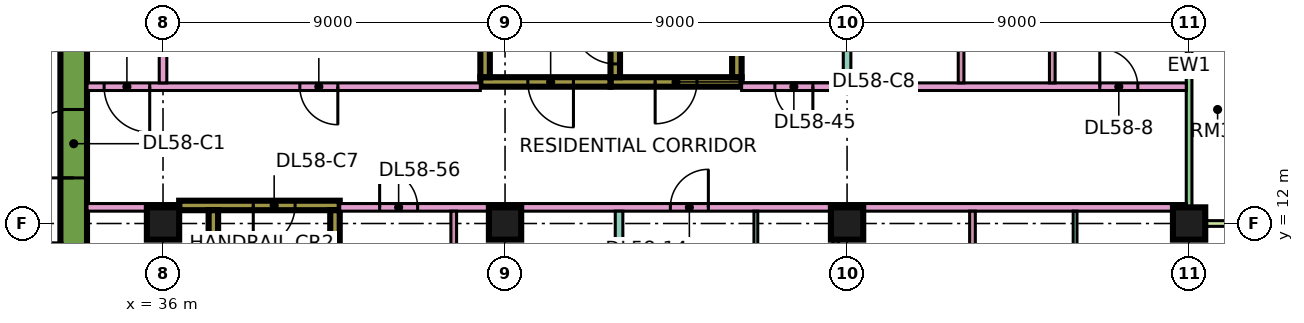
"""IFC4 building model, lengths in metres.
Left out: names, types, materials, properties, quantities, classifications, styles, units other than length and angle.
Written with IfcOpenShell. Run it as: python <this file> out.ifc"""

import sys

from ifc_helpers import new_model, si_unit, direction, frame, frame_2d, origin, origin_2d, place, context, subcontext, project, spatial, rectangle, extrude, element, fill, save


model = new_model("IFC4")
c1 = context("Model", 3, precision=1e-05, world=origin(), true_north=direction((0.0, 1.0)))
c2 = subcontext(c1, "Body", "Model", "MODEL_VIEW")
j1 = project(units=[si_unit("LENGTHUNIT", "METRE"), si_unit("PLANEANGLEUNIT", "RADIAN")], contexts=[c1])
p1 = place(None, origin())
s1 = spatial("IfcSite", under=j1, at=p1, CompositionType="ELEMENT")
p2 = place(p1, origin())
s2 = spatial("IfcBuilding", under=s1, at=p2, CompositionType="ELEMENT")
p3 = place(p2, frame((0.0, 0.0, 245.4)))
s3 = spatial("IfcBuildingStorey", under=s2, at=p3, CompositionType="ELEMENT", Elevation=245.4)
for number, where, z_axis, x_axis in (
    (1, (36.0, 12.0, 0.0), (0.0, 0.0, 1.0), (1.0, 0.0, 0.0)),
    (2, (45.0, 12.0, 0.0), (0.0, 0.0, 1.0), (1.0, 0.0, 0.0)),
    (3, (54.0, 12.0, 0.0), (0.0, 0.0, 1.0), (1.0, 0.0, 0.0)),
    (4, (63.0, 12.0, 0.0), (0.0, 0.0, 1.0), (1.0, 0.0, 0.0)),
):
    element("IfcColumn", number, at=place(p3, frame(where, z_axis=z_axis, x_axis=x_axis)), inside=s3, PredefinedType="COLUMN", context=c2, shape_type="SweptSolid", body=[
        extrude(rectangle(XDim=0.85, YDim=0.85, at=origin_2d()), origin(), (0.0, 0.0, 1.0), 3.75),
    ])
p4 = place(p3, frame((33.65, 7.7, 0.0), z_axis=(0.0, 0.0, 1.0), x_axis=(0.0, 1.0, 0.0)))
e5 = element("IfcWall", 5, at=p4, inside=s3, PredefinedType="SHEAR", context=c2, shape_type="SweptSolid", body=[
    extrude(rectangle(XDim=11.6, YDim=0.7, at=frame_2d((5.8, 0.0))), origin(), (0.0, 0.0, 1.0), 3.75),
])
p5 = place(p4, frame((5.5, 0.0, 0.0)))
e6 = element("IfcOpeningElement", 6, at=p5, cuts=e5, PredefinedType="OPENING", context=c2, shape_type="SweptSolid", body=[
    extrude(rectangle(XDim=1.8, YDim=2.4, at=frame_2d((0.9, 1.2))), frame((0.0, 0.36, 0.0), z_axis=(0.0, -1.0, 0.0), x_axis=(1.0, 0.0, 0.0)), (0.0, 0.0, 1.0), 0.72),
])
p6 = place(p3, frame((36.425, 12.475, 0.0), z_axis=(0.0, 0.0, 1.0), x_axis=(1.0, 0.0, 0.0)))
e7 = element("IfcWall", 7, at=p6, inside=s3, PredefinedType="SHEAR", context=c2, shape_type="SweptSolid", body=[
    extrude(rectangle(XDim=4.225, YDim=0.25, at=frame_2d((2.112, 0.0))), origin(), (0.0, 0.0, 1.0), 3.75),
])
p7 = place(p6, frame((1.95, 0.0, 0.0)))
e8 = element("IfcOpeningElement", 8, at=p7, cuts=e7, PredefinedType="OPENING", context=c2, shape_type="SweptSolid", body=[
    extrude(rectangle(XDim=1.1, YDim=2.2, at=frame_2d((0.55, 1.1))), frame((0.0, 0.135, 0.0), z_axis=(0.0, -1.0, 0.0), x_axis=(1.0, 0.0, 0.0)), (0.0, 0.0, 1.0), 0.27),
])
for number, where, z_axis, x_axis in (
    (9, (37.325, 5.85, 0.0), (0.0, 0.0, 1.0), (0.0, 1.0, 0.0)),
    (10, (40.525, 5.85, 0.0), (0.0, 0.0, 1.0), (0.0, 1.0, 0.0)),
):
    element("IfcWall", number, at=place(p3, frame(where, z_axis=z_axis, x_axis=x_axis)), inside=s3, PredefinedType="SHEAR", context=c2, shape_type="SweptSolid", body=[
        extrude(rectangle(XDim=6.5, YDim=0.25, at=frame_2d((3.25, 0.0))), origin(), (0.0, 0.0, 1.0), 3.75),
    ])
p8 = place(p3, frame((47.775, 15.725, 0.0), z_axis=(0.0, 0.0, 1.0), x_axis=(1.0, 0.0, 0.0)))
e11 = element("IfcWall", 11, at=p8, inside=s3, PredefinedType="SHEAR", context=c2, shape_type="SweptSolid", body=[
    extrude(rectangle(XDim=3.45, YDim=0.25, at=frame_2d((1.725, 0.0))), origin(), (0.0, 0.0, 1.0), 3.75),
])
p9 = place(p8, frame((1.175, 0.0, 0.0)))
e12 = element("IfcOpeningElement", 12, at=p9, cuts=e11, PredefinedType="OPENING", context=c2, shape_type="SweptSolid", body=[
    extrude(rectangle(XDim=1.1, YDim=2.2, at=frame_2d((0.55, 1.1))), frame((0.0, 0.135, 0.0), z_axis=(0.0, -1.0, 0.0), x_axis=(1.0, 0.0, 0.0)), (0.0, 0.0, 1.0), 0.27),
])
p10 = place(p3, frame((47.9, 15.85, 0.0), z_axis=(0.0, 0.0, 1.0), x_axis=(0.0, 1.0, 0.0)))
e13 = element("IfcWall", 13, at=p10, inside=s3, PredefinedType="SHEAR", context=c2, shape_type="SweptSolid", body=[
    extrude(rectangle(XDim=6.5, YDim=0.25, at=frame_2d((3.25, 0.0))), origin(), (0.0, 0.0, 1.0), 3.75),
])
p11 = place(p10, frame((0.35, 0.0, 0.0)))
e14 = element("IfcOpeningElement", 14, at=p11, cuts=e13, PredefinedType="OPENING", context=c2, shape_type="SweptSolid", body=[
    extrude(rectangle(XDim=1.1, YDim=2.2, at=frame_2d((0.55, 1.1))), frame((0.0, 0.135, 0.0), z_axis=(0.0, -1.0, 0.0), x_axis=(1.0, 0.0, 0.0)), (0.0, 0.0, 1.0), 0.27),
])
p12 = place(p3, frame((51.1, 15.85, 0.0), z_axis=(0.0, 0.0, 1.0), x_axis=(0.0, 1.0, 0.0)))
e15 = element("IfcWall", 15, at=p12, inside=s3, PredefinedType="SHEAR", context=c2, shape_type="SweptSolid", body=[
    extrude(rectangle(XDim=6.5, YDim=0.25, at=frame_2d((3.25, 0.0))), origin(), (0.0, 0.0, 1.0), 3.75),
])
p13 = place(p3, frame((44.35, 15.725, 0.0), z_axis=(0.0, 0.0, 1.0), x_axis=(1.0, 0.0, 0.0)))
e16 = element("IfcWall", 16, at=p13, inside=s3, PredefinedType="SHEAR", context=c2, shape_type="SweptSolid", body=[
    extrude(rectangle(XDim=3.425, YDim=0.25, at=frame_2d((1.712, 0.0))), origin(), (0.0, 0.0, 1.0), 3.75),
])
p14 = place(p13, frame((1.25, 0.0, 0.0)))
e17 = element("IfcOpeningElement", 17, at=p14, cuts=e16, PredefinedType="OPENING", context=c2, shape_type="SweptSolid", body=[
    extrude(rectangle(XDim=1.2, YDim=2.2, at=frame_2d((0.6, 1.1))), frame((0.0, 0.135, 0.0), z_axis=(0.0, -1.0, 0.0), x_axis=(1.0, 0.0, 0.0)), (0.0, 0.0, 1.0), 0.27),
])
p15 = place(p3, frame((44.475, 15.85, 0.0), z_axis=(0.0, 0.0, 1.0), x_axis=(0.0, 1.0, 0.0)))
e18 = element("IfcWall", 18, at=p15, inside=s3, PredefinedType="SHEAR", context=c2, shape_type="SweptSolid", body=[
    extrude(rectangle(XDim=6.5, YDim=0.25, at=frame_2d((3.25, 0.0))), origin(), (0.0, 0.0, 1.0), 3.75),
])
p16 = place(p15, frame((1.75, 0.0, 0.0)))
e19 = element("IfcOpeningElement", 19, at=p16, cuts=e18, PredefinedType="OPENING", context=c2, shape_type="SweptSolid", body=[
    extrude(rectangle(XDim=1.1, YDim=2.2, at=frame_2d((0.55, 1.1))), frame((0.0, 0.135, 0.0), z_axis=(0.0, -1.0, 0.0), x_axis=(1.0, 0.0, 0.0)), (0.0, 0.0, 1.0), 0.27),
])
p17 = place(p15, frame((4.3, 0.0, 0.0)))
e20 = element("IfcOpeningElement", 20, at=p17, cuts=e18, PredefinedType="OPENING", context=c2, shape_type="SweptSolid", body=[
    extrude(rectangle(XDim=1.1, YDim=2.2, at=frame_2d((0.55, 1.1))), frame((0.0, 0.135, 0.0), z_axis=(0.0, -1.0, 0.0), x_axis=(1.0, 0.0, 0.0)), (0.0, 0.0, 1.0), 0.27),
])
p18 = place(p3, frame((63.0, 12.075, 0.0), z_axis=(0.0, 0.0, 1.0), x_axis=(0.0, 1.0, 0.0)))
e21 = element("IfcWall", 21, at=p18, inside=s3, PredefinedType="SOLIDWALL", context=c2, shape_type="SweptSolid", body=[
    extrude(rectangle(XDim=10.35, YDim=0.15, at=frame_2d((5.175, 0.0))), origin(), (0.0, 0.0, 1.0), 3.35),
])
p19 = place(p18, frame((4.875, 0.0, 0.0)))
e22 = element("IfcOpeningElement", 22, at=p19, cuts=e21, PredefinedType="OPENING", context=c2, shape_type="SweptSolid", body=[
    extrude(rectangle(XDim=1.8, YDim=2.4, at=frame_2d((0.9, 1.2))), frame((0.0, 0.085, 0.0), z_axis=(0.0, -1.0, 0.0), x_axis=(1.0, 0.0, 0.0)), (0.0, 0.0, 1.0), 0.17),
])
p20 = place(p18, frame((8.587, 0.0, 0.45)))
e23 = element("IfcOpeningElement", 23, at=p20, cuts=e21, PredefinedType="OPENING", context=c2, shape_type="SweptSolid", body=[
    extrude(rectangle(XDim=1.2, YDim=2.4, at=frame_2d((0.6, 1.2))), frame((0.0, 0.085, 0.0), z_axis=(0.0, -1.0, 0.0), x_axis=(1.0, 0.0, 0.0)), (0.0, 0.0, 1.0), 0.17),
])
p21 = place(p3, frame((64.5, 12.0, 0.0), z_axis=(0.0, 0.0, 1.0), x_axis=(-1.0, 0.0, 0.0)))
e24 = element("IfcWall", 24, at=p21, inside=s3, PredefinedType="SOLIDWALL", context=c2, shape_type="SweptSolid", body=[
    extrude(rectangle(XDim=1.5, YDim=0.15, at=frame_2d((0.75, 0.0))), origin(), (0.0, 0.0, 1.0), 3.35),
])
p22 = place(p3, frame((34.0, 12.425, 0.0), z_axis=(0.0, 0.0, 1.0), x_axis=(1.0, 0.0, 0.0)))
e25 = element("IfcWall", 25, at=p22, inside=s3, PredefinedType="PARTITIONING", context=c2, shape_type="SweptSolid", body=[
    extrude(rectangle(XDim=2.426, YDim=0.2, at=frame_2d((1.213, 0.0))), origin(), (0.0, 0.0, 1.0), 3.35),
])
p23 = place(p3, frame((34.0, 15.6, 0.0), z_axis=(0.0, 0.0, 1.0), x_axis=(1.0, 0.0, 0.0)))
e26 = element("IfcWall", 26, at=p23, inside=s3, PredefinedType="PARTITIONING", context=c2, shape_type="SweptSolid", body=[
    extrude(rectangle(XDim=10.35, YDim=0.2, at=frame_2d((5.175, 0.0))), origin(), (0.0, 0.0, 1.0), 3.35),
])
p24 = place(p23, frame((5.6, 0.0, 0.0)))
e27 = element("IfcOpeningElement", 27, at=p24, cuts=e26, PredefinedType="OPENING", context=c2, shape_type="SweptSolid", body=[
    extrude(rectangle(XDim=1.0, YDim=2.1, at=frame_2d((0.5, 1.05))), frame((0.0, 0.11, 0.0), z_axis=(0.0, -1.0, 0.0), x_axis=(1.0, 0.0, 0.0)), (0.0, 0.0, 1.0), 0.22),
])
p25 = place(p23, frame((0.45, 0.0, 0.0)))
e28 = element("IfcOpeningElement", 28, at=p25, cuts=e26, PredefinedType="OPENING", context=c2, shape_type="SweptSolid", body=[
    extrude(rectangle(XDim=1.2, YDim=2.1, at=frame_2d((0.6, 1.05))), frame((0.0, 0.11, 0.0), z_axis=(0.0, -1.0, 0.0), x_axis=(1.0, 0.0, 0.0)), (0.0, 0.0, 1.0), 0.22),
])
p26 = place(p3, frame((36.0, 15.7, 0.0), z_axis=(0.0, 0.0, 1.0), x_axis=(0.0, 1.0, 0.0)))
e29 = element("IfcWall", 29, at=p26, inside=s3, PredefinedType="PARTITIONING", context=c2, shape_type="SweptSolid", body=[
    extrude(rectangle(XDim=8.3, YDim=0.2, at=frame_2d((4.15, 0.0))), origin(), (0.0, 0.0, 1.0), 3.35),
])
p27 = place(p3, frame((40.65, 12.425, 0.0), z_axis=(0.0, 0.0, 1.0), x_axis=(1.0, 0.0, 0.0)))
e30 = element("IfcWall", 30, at=p27, inside=s3, PredefinedType="PARTITIONING", context=c2, shape_type="SweptSolid", body=[
    extrude(rectangle(XDim=22.276, YDim=0.2, at=frame_2d((11.138, 0.0))), origin(), (0.0, 0.0, 1.0), 3.35),
])
p28 = place(p27, frame((8.7, 0.0, 0.0)))
e31 = element("IfcOpeningElement", 31, at=p28, cuts=e30, PredefinedType="OPENING", context=c2, shape_type="SweptSolid", body=[
    extrude(rectangle(XDim=1.0, YDim=2.1, at=frame_2d((0.5, 1.05))), frame((0.0, 0.11, 0.0), z_axis=(0.0, -1.0, 0.0), x_axis=(1.0, 0.0, 0.0)), (0.0, 0.0, 1.0), 0.22),
])
p29 = place(p27, frame((1.05, 0.0, 0.0)))
e32 = element("IfcOpeningElement", 32, at=p29, cuts=e30, PredefinedType="OPENING", context=c2, shape_type="SweptSolid", body=[
    extrude(rectangle(XDim=1.0, YDim=2.1, at=frame_2d((0.5, 1.05))), frame((0.0, 0.11, 0.0), z_axis=(0.0, -1.0, 0.0), x_axis=(1.0, 0.0, 0.0)), (0.0, 0.0, 1.0), 0.22),
])
p30 = place(p3, frame((43.65, 5.825, 0.0), z_axis=(0.0, 0.0, 1.0), x_axis=(0.0, 1.0, 0.0)))
e33 = element("IfcWall", 33, at=p30, inside=s3, PredefinedType="PARTITIONING", context=c2, shape_type="SweptSolid", body=[
    extrude(rectangle(XDim=6.5, YDim=0.15, at=frame_2d((3.25, 0.0))), origin(), (0.0, 0.0, 1.0), 3.35),
])
p31 = place(p30, frame((4.425, 0.0, 0.0)))
e34 = element("IfcOpeningElement", 34, at=p31, cuts=e33, PredefinedType="OPENING", context=c2, shape_type="SweptSolid", body=[
    extrude(rectangle(XDim=0.9, YDim=2.1, at=frame_2d((0.45, 1.05))), frame((0.0, 0.085, 0.0), z_axis=(0.0, -1.0, 0.0), x_axis=(1.0, 0.0, 0.0)), (0.0, 0.0, 1.0), 0.17),
])
p32 = place(p3, frame((48.0, 0.0, 0.0), z_axis=(0.0, 0.0, 1.0), x_axis=(0.0, 1.0, 0.0)))
e35 = element("IfcWall", 35, at=p32, inside=s3, PredefinedType="PARTITIONING", context=c2, shape_type="SweptSolid", body=[
    extrude(rectangle(XDim=12.325, YDim=0.2, at=frame_2d((6.163, 0.0))), origin(), (0.0, 0.0, 1.0), 3.35),
])
p33 = place(p3, frame((51.225, 15.6, 0.0), z_axis=(0.0, 0.0, 1.0), x_axis=(1.0, 0.0, 0.0)))
e36 = element("IfcWall", 36, at=p33, inside=s3, PredefinedType="PARTITIONING", context=c2, shape_type="SweptSolid", body=[
    extrude(rectangle(XDim=11.701, YDim=0.2, at=frame_2d((5.851, 0.0))), origin(), (0.0, 0.0, 1.0), 3.35),
])
p34 = place(p33, frame((9.425, 0.0, 0.0)))
e37 = element("IfcOpeningElement", 37, at=p34, cuts=e36, PredefinedType="OPENING", context=c2, shape_type="SweptSolid", body=[
    extrude(rectangle(XDim=1.0, YDim=2.1, at=frame_2d((0.5, 1.05))), frame((0.0, 0.11, 0.0), z_axis=(0.0, -1.0, 0.0), x_axis=(1.0, 0.0, 0.0)), (0.0, 0.0, 1.0), 0.22),
])
p35 = place(p33, frame((0.875, 0.0, 0.0)))
e38 = element("IfcOpeningElement", 38, at=p35, cuts=e36, PredefinedType="OPENING", context=c2, shape_type="SweptSolid", body=[
    extrude(rectangle(XDim=1.0, YDim=2.1, at=frame_2d((0.5, 1.05))), frame((0.0, 0.11, 0.0), z_axis=(0.0, -1.0, 0.0), x_axis=(1.0, 0.0, 0.0)), (0.0, 0.0, 1.0), 0.22),
])
p36 = place(p3, frame((51.6, 7.7, 0.0), z_axis=(0.0, 0.0, 1.0), x_axis=(0.0, 1.0, 0.0)))
e39 = element("IfcWall", 39, at=p36, inside=s3, PredefinedType="PARTITIONING", context=c2, shape_type="SweptSolid", body=[
    extrude(rectangle(XDim=4.625, YDim=0.1, at=frame_2d((2.312, 0.0))), origin(), (0.0, 0.0, 1.0), 3.35),
])
p37 = place(p36, frame((1.875, 0.0, 0.0)))
e40 = element("IfcOpeningElement", 40, at=p37, cuts=e39, PredefinedType="OPENING", context=c2, shape_type="SweptSolid", body=[
    extrude(rectangle(XDim=0.9, YDim=2.1, at=frame_2d((0.45, 1.05))), frame((0.0, 0.06, 0.0), z_axis=(0.0, -1.0, 0.0), x_axis=(1.0, 0.0, 0.0)), (0.0, 0.0, 1.0), 0.12),
])
p38 = place(p3, frame((53.7, 7.7, 0.0), z_axis=(0.0, 0.0, 1.0), x_axis=(0.0, 1.0, 0.0)))
e41 = element("IfcWall", 41, at=p38, inside=s3, PredefinedType="PARTITIONING", context=c2, shape_type="SweptSolid", body=[
    extrude(rectangle(XDim=4.625, YDim=0.15, at=frame_2d((2.312, 0.0))), origin(), (0.0, 0.0, 1.0), 3.35),
])
p39 = place(p3, frame((54.0, 15.7, 0.0), z_axis=(0.0, 0.0, 1.0), x_axis=(0.0, 1.0, 0.0)))
e42 = element("IfcWall", 42, at=p39, inside=s3, PredefinedType="PARTITIONING", context=c2, shape_type="SweptSolid", body=[
    extrude(rectangle(XDim=8.3, YDim=0.2, at=frame_2d((4.15, 0.0))), origin(), (0.0, 0.0, 1.0), 3.35),
])
p40 = place(p3, frame((57.0, 15.7, 0.0), z_axis=(0.0, 0.0, 1.0), x_axis=(0.0, 1.0, 0.0)))
e43 = element("IfcWall", 43, at=p40, inside=s3, PredefinedType="PARTITIONING", context=c2, shape_type="SweptSolid", body=[
    extrude(rectangle(XDim=3.125, YDim=0.15, at=frame_2d((1.562, 0.0))), origin(), (0.0, 0.0, 1.0), 3.35),
])
p41 = place(p3, frame((57.3, 7.7, 0.0), z_axis=(0.0, 0.0, 1.0), x_axis=(0.0, 1.0, 0.0)))
e44 = element("IfcWall", 44, at=p41, inside=s3, PredefinedType="PARTITIONING", context=c2, shape_type="SweptSolid", body=[
    extrude(rectangle(XDim=4.625, YDim=0.15, at=frame_2d((2.312, 0.0))), origin(), (0.0, 0.0, 1.0), 3.35),
])
p42 = place(p3, frame((59.4, 15.7, 0.0), z_axis=(0.0, 0.0, 1.0), x_axis=(0.0, 1.0, 0.0)))
e45 = element("IfcWall", 45, at=p42, inside=s3, PredefinedType="PARTITIONING", context=c2, shape_type="SweptSolid", body=[
    extrude(rectangle(XDim=3.125, YDim=0.15, at=frame_2d((1.562, 0.0))), origin(), (0.0, 0.0, 1.0), 3.35),
])
p43 = place(p3, frame((60.0, 7.7, 0.0), z_axis=(0.0, 0.0, 1.0), x_axis=(0.0, 1.0, 0.0)))
e46 = element("IfcWall", 46, at=p43, inside=s3, PredefinedType="PARTITIONING", context=c2, shape_type="SweptSolid", body=[
    extrude(rectangle(XDim=4.625, YDim=0.1, at=frame_2d((2.312, 0.0))), origin(), (0.0, 0.0, 1.0), 3.35),
])
p44 = place(p5, origin())
e47 = element("IfcDoor", 47, at=p44, inside=s3, OperationType="DOUBLE_DOOR_SINGLE_SWING", PredefinedType="DOOR", context=c2, shape_type="SweptSolid", body=[
    extrude(rectangle(XDim=1.8, YDim=2.4, at=frame_2d((0.9, 1.2))), frame((0.0, 0.025, 0.0), z_axis=(0.0, -1.0, 0.0), x_axis=(1.0, 0.0, 0.0)), (0.0, 0.0, 1.0), 0.05),
])
fill(e6, e47)
p45 = place(p7, frame((1.1, 0.0, 0.0), z_axis=(0.0, 0.0, 1.0), x_axis=(-1.0, 0.0, 0.0)))
e48 = element("IfcDoor", 48, at=p45, inside=s3, OperationType="SINGLE_SWING_LEFT", PredefinedType="DOOR", context=c2, shape_type="SweptSolid", body=[
    extrude(rectangle(XDim=1.1, YDim=2.2, at=frame_2d((0.55, 1.1))), frame((0.0, 0.025, 0.0), z_axis=(0.0, -1.0, 0.0), x_axis=(1.0, 0.0, 0.0)), (0.0, 0.0, 1.0), 0.05),
])
fill(e8, e48)
p46 = place(p9, frame((1.1, 0.0, 0.0), z_axis=(0.0, 0.0, 1.0), x_axis=(-1.0, 0.0, 0.0)))
e49 = element("IfcDoor", 49, at=p46, inside=s3, OperationType="SINGLE_SWING_LEFT", PredefinedType="DOOR", context=c2, shape_type="SweptSolid", body=[
    extrude(rectangle(XDim=1.1, YDim=2.2, at=frame_2d((0.55, 1.1))), frame((0.0, 0.025, 0.0), z_axis=(0.0, -1.0, 0.0), x_axis=(1.0, 0.0, 0.0)), (0.0, 0.0, 1.0), 0.05),
])
fill(e12, e49)
p47 = place(p14, origin())
e50 = element("IfcDoor", 50, at=p47, inside=s3, OperationType="SINGLE_SWING_RIGHT", PredefinedType="DOOR", context=c2, shape_type="SweptSolid", body=[
    extrude(rectangle(XDim=1.2, YDim=2.2, at=frame_2d((0.6, 1.1))), frame((0.0, 0.025, 0.0), z_axis=(0.0, -1.0, 0.0), x_axis=(1.0, 0.0, 0.0)), (0.0, 0.0, 1.0), 0.05),
])
fill(e17, e50)
p48 = place(p11, frame((1.1, 0.0, 0.0), z_axis=(0.0, 0.0, 1.0), x_axis=(-1.0, 0.0, 0.0)))
e51 = element("IfcDoor", 51, at=p48, inside=s3, OperationType="SINGLE_SWING_RIGHT", PredefinedType="DOOR", context=c2, shape_type="SweptSolid", body=[
    extrude(rectangle(XDim=1.1, YDim=2.2, at=frame_2d((0.55, 1.1))), frame((0.0, 0.025, 0.0), z_axis=(0.0, -1.0, 0.0), x_axis=(1.0, 0.0, 0.0)), (0.0, 0.0, 1.0), 0.05),
])
fill(e14, e51)
p49 = place(p24, origin())
e52 = element("IfcDoor", 52, at=p49, inside=s3, OperationType="SINGLE_SWING_RIGHT", PredefinedType="DOOR", context=c2, shape_type="SweptSolid", body=[
    extrude(rectangle(XDim=1.0, YDim=2.1, at=frame_2d((0.5, 1.05))), frame((0.0, 0.025, 0.0), z_axis=(0.0, -1.0, 0.0), x_axis=(1.0, 0.0, 0.0)), (0.0, 0.0, 1.0), 0.05),
])
fill(e27, e52)
p50 = place(p34, origin())
e53 = element("IfcDoor", 53, at=p50, inside=s3, OperationType="SINGLE_SWING_LEFT", PredefinedType="DOOR", context=c2, shape_type="SweptSolid", body=[
    extrude(rectangle(XDim=1.0, YDim=2.1, at=frame_2d((0.5, 1.05))), frame((0.0, 0.025, 0.0), z_axis=(0.0, -1.0, 0.0), x_axis=(1.0, 0.0, 0.0)), (0.0, 0.0, 1.0), 0.05),
])
fill(e37, e53)
p51 = place(p28, frame((1.0, 0.0, 0.0), z_axis=(0.0, 0.0, 1.0), x_axis=(-1.0, 0.0, 0.0)))
e54 = element("IfcDoor", 54, at=p51, inside=s3, OperationType="SINGLE_SWING_RIGHT", PredefinedType="DOOR", context=c2, shape_type="SweptSolid", body=[
    extrude(rectangle(XDim=1.0, YDim=2.1, at=frame_2d((0.5, 1.05))), frame((0.0, 0.025, 0.0), z_axis=(0.0, -1.0, 0.0), x_axis=(1.0, 0.0, 0.0)), (0.0, 0.0, 1.0), 0.05),
])
fill(e31, e54)
p52 = place(p25, origin())
e55 = element("IfcDoor", 55, at=p52, inside=s3, OperationType="SINGLE_SWING_RIGHT", PredefinedType="DOOR", context=c2, shape_type="SweptSolid", body=[
    extrude(rectangle(XDim=1.2, YDim=2.1, at=frame_2d((0.6, 1.05))), frame((0.0, 0.025, 0.0), z_axis=(0.0, -1.0, 0.0), x_axis=(1.0, 0.0, 0.0)), (0.0, 0.0, 1.0), 0.05),
])
fill(e28, e55)
p53 = place(p35, origin())
e56 = element("IfcDoor", 56, at=p53, inside=s3, OperationType="SINGLE_SWING_RIGHT", PredefinedType="DOOR", context=c2, shape_type="SweptSolid", body=[
    extrude(rectangle(XDim=1.0, YDim=2.1, at=frame_2d((0.5, 1.05))), frame((0.0, 0.025, 0.0), z_axis=(0.0, -1.0, 0.0), x_axis=(1.0, 0.0, 0.0)), (0.0, 0.0, 1.0), 0.05),
])
fill(e38, e56)
p54 = place(p29, origin())
e57 = element("IfcDoor", 57, at=p54, inside=s3, OperationType="SINGLE_SWING_LEFT", PredefinedType="DOOR", context=c2, shape_type="SweptSolid", body=[
    extrude(rectangle(XDim=1.0, YDim=2.1, at=frame_2d((0.5, 1.05))), frame((0.0, 0.025, 0.0), z_axis=(0.0, -1.0, 0.0), x_axis=(1.0, 0.0, 0.0)), (0.0, 0.0, 1.0), 0.05),
])
fill(e32, e57)
save(model, sys.argv[1])
